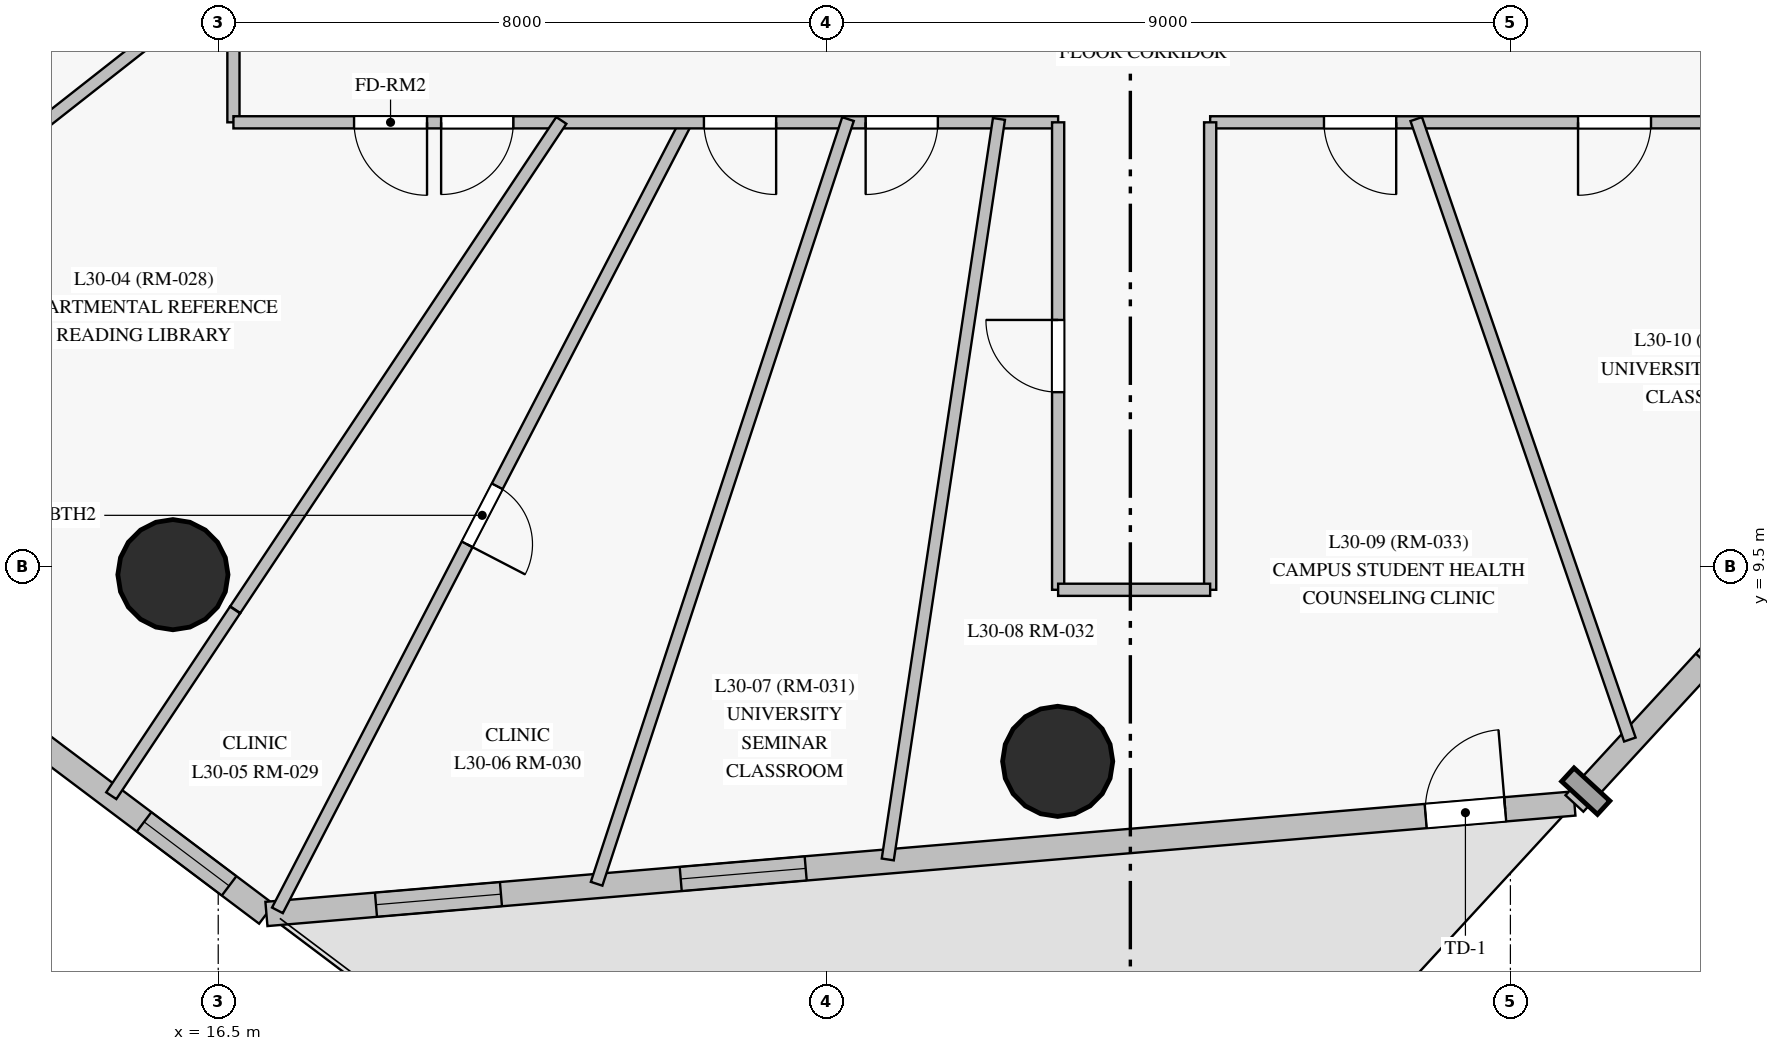
"""IFC4 building model, lengths in metres.
Left out: names, types, materials, properties, quantities, classifications, styles, units other than length and angle.
Written with IfcOpenShell. Run it as: python <this file> out.ifc"""

import sys

from ifc_helpers import new_model, si_unit, direction, frame, frame_2d, origin, origin_with_axes, origin_2d, place, context, subcontext, project, spatial, rectangle, circle, extrude, source, transform, mapped, element, fill, save


model = new_model("IFC4")
c1 = context("Model", 3, precision=1e-05, world=origin(), true_north=direction((0.0, 1.0)))
c2 = subcontext(c1, "Body", "Model", "MODEL_VIEW")
j1 = project(units=[si_unit("LENGTHUNIT", "METRE"), si_unit("PLANEANGLEUNIT", "RADIAN")], contexts=[c1])
p1 = place(None, origin())
s1 = spatial("IfcSite", under=j1, at=p1, CompositionType="ELEMENT")
p2 = place(p1, origin())
s2 = spatial("IfcBuilding", under=s1, at=p2, CompositionType="ELEMENT")
p3 = place(p2, frame((0.0, 0.0, 111.45)))
s3 = spatial("IfcBuildingStorey", under=s2, at=p3, CompositionType="ELEMENT", Elevation=111.45)
m1 = source(origin_with_axes(), c2, "Body", "SweptSolid", [
    extrude(circle(Radius=0.725, at=origin_2d()), origin(), (0.0, 0.0, 1.0), 3.05),
])
for number, where, z_axis, x_axis in (
    (1, (15.904, 9.399, 0.0), (0.0, 0.0, 1.0), (1.0, 0.0, 0.0)),
    (2, (27.544, 6.943, 0.0), (0.0, 0.0, 1.0), (1.0, 0.0, 0.0)),
):
    element("IfcColumn", number, at=place(p3, frame(where, z_axis=z_axis, x_axis=x_axis)), inside=s3, PredefinedType="COLUMN", context=c2, shape_type="MappedRepresentation", body=[
        mapped(m1, transform((0.0, 0.0, 0.0), scale=1.0)),
    ])
p4 = place(p3, frame((11.539, 9.148, 0.0), z_axis=(0.0, 0.0, 1.0), x_axis=(0.798890081763, -0.601477046329, 0.0)))
e3 = element("IfcWall", 3, at=p4, inside=s3, PredefinedType="SOLIDWALL", context=c2, shape_type="SweptSolid", body=[
    extrude(rectangle(XDim=7.003, YDim=0.32, at=frame_2d((3.502, 0.0))), origin(), (0.0, 0.0, 1.0), 2.825),
])
p5 = place(p4, frame((1.422, 0.0, 0.85)))
e4 = element("IfcOpeningElement", 4, at=p5, cuts=e3, PredefinedType="OPENING", context=c2, shape_type="SweptSolid", body=[
    extrude(rectangle(XDim=1.65, YDim=1.65, at=frame_2d((0.825, 0.825))), frame((0.0, 0.17, 0.0), z_axis=(0.0, -1.0, 0.0), x_axis=(1.0, 0.0, 0.0)), (0.0, 0.0, 1.0), 0.34),
])
p6 = place(p4, frame((4.989, 0.0, 0.85)))
e5 = element("IfcOpeningElement", 5, at=p6, cuts=e3, PredefinedType="OPENING", context=c2, shape_type="SweptSolid", body=[
    extrude(rectangle(XDim=1.4, YDim=1.65, at=frame_2d((0.7, 0.825))), frame((0.0, 0.17, 0.0), z_axis=(0.0, -1.0, 0.0), x_axis=(1.0, 0.0, 0.0)), (0.0, 0.0, 1.0), 0.34),
])
p7 = place(p3, frame((17.134, 4.935, 0.0), z_axis=(0.0, 0.0, 1.0), x_axis=(0.996451131553, 0.084173288083, 0.0)))
e6 = element("IfcWall", 6, at=p7, inside=s3, PredefinedType="SOLIDWALL", context=c2, shape_type="SweptSolid", body=[
    extrude(rectangle(XDim=17.269, YDim=0.32, at=frame_2d((8.635, 0.0))), origin(), (0.0, 0.0, 1.0), 2.825),
])
p8 = place(p7, frame((1.446, 0.0, 0.85)))
e7 = element("IfcOpeningElement", 7, at=p8, cuts=e6, PredefinedType="OPENING", context=c2, shape_type="SweptSolid", body=[
    extrude(rectangle(XDim=1.65, YDim=1.65, at=frame_2d((0.825, 0.825))), frame((0.0, 0.17, 0.0), z_axis=(0.0, -1.0, 0.0), x_axis=(1.0, 0.0, 0.0)), (0.0, 0.0, 1.0), 0.34),
])
p9 = place(p7, frame((5.47, 0.0, 0.85)))
e8 = element("IfcOpeningElement", 8, at=p9, cuts=e6, PredefinedType="OPENING", context=c2, shape_type="SweptSolid", body=[
    extrude(rectangle(XDim=1.65, YDim=1.65, at=frame_2d((0.825, 0.825))), frame((0.0, 0.17, 0.0), z_axis=(0.0, -1.0, 0.0), x_axis=(1.0, 0.0, 0.0)), (0.0, 0.0, 1.0), 0.34),
])
p10 = place(p7, frame((15.305, 0.0, 0.0)))
e9 = element("IfcOpeningElement", 9, at=p10, cuts=e6, PredefinedType="OPENING", context=c2, shape_type="SweptSolid", body=[
    extrude(rectangle(XDim=1.05, YDim=2.12, at=frame_2d((0.525, 1.06))), frame((0.0, 0.17, 0.0), z_axis=(0.0, -1.0, 0.0), x_axis=(1.0, 0.0, 0.0)), (0.0, 0.0, 1.0), 0.34),
])
p11 = place(p3, frame((34.342, 6.389, 0.0), z_axis=(0.0, 0.0, 1.0), x_axis=(0.677119694004, 0.735872896628, 0.0)))
e10 = element("IfcWall", 10, at=p11, inside=s3, PredefinedType="SOLIDWALL", context=c2, shape_type="SweptSolid", body=[
    extrude(rectangle(XDim=9.462, YDim=0.32, at=frame_2d((4.731, 0.0))), origin(), (0.0, 0.0, 1.0), 2.825),
])
p12 = place(p11, frame((2.533, 0.0, 0.85)))
e11 = element("IfcOpeningElement", 11, at=p12, cuts=e10, PredefinedType="OPENING", context=c2, shape_type="SweptSolid", body=[
    extrude(rectangle(XDim=1.65, YDim=1.65, at=frame_2d((0.825, 0.825))), frame((0.0, 0.17, 0.0), z_axis=(0.0, -1.0, 0.0), x_axis=(1.0, 0.0, 0.0)), (0.0, 0.0, 1.0), 0.34),
])
p13 = place(p11, frame((6.349, 0.0, 0.85)))
e12 = element("IfcOpeningElement", 12, at=p13, cuts=e10, PredefinedType="OPENING", context=c2, shape_type="SweptSolid", body=[
    extrude(rectangle(XDim=1.65, YDim=1.65, at=frame_2d((0.825, 0.825))), frame((0.0, 0.17, 0.0), z_axis=(0.0, -1.0, 0.0), x_axis=(1.0, 0.0, 0.0)), (0.0, 0.0, 1.0), 0.34),
])
p14 = place(p3, frame((16.7, 15.35, 0.0), z_axis=(0.0, 0.0, 1.0), x_axis=(0.0, 1.0, 0.0)))
e13 = element("IfcWall", 13, at=p14, inside=s3, PredefinedType="PARTITIONING", context=c2, shape_type="SweptSolid", body=[
    extrude(rectangle(XDim=22.3, YDim=0.16, at=frame_2d((11.15, 0.0))), origin(), (0.0, 0.0, 1.0), 2.225),
])
p15 = place(p14, frame((10.635, 0.0, 0.0)))
e14 = element("IfcOpeningElement", 14, at=p15, cuts=e13, PredefinedType="OPENING", context=c2, shape_type="SweptSolid", body=[
    extrude(rectangle(XDim=0.95, YDim=2.15, at=frame_2d((0.475, 1.075))), frame((0.0, 0.09, 0.0), z_axis=(0.0, -1.0, 0.0), x_axis=(1.0, 0.0, 0.0)), (0.0, 0.0, 1.0), 0.18),
])
p16 = place(p14, frame((5.64, 0.0, 0.0)))
e15 = element("IfcOpeningElement", 15, at=p16, cuts=e13, PredefinedType="OPENING", context=c2, shape_type="SweptSolid", body=[
    extrude(rectangle(XDim=0.96, YDim=2.15, at=frame_2d((0.48, 1.075))), frame((0.0, 0.09, 0.0), z_axis=(0.0, -1.0, 0.0), x_axis=(1.0, 0.0, 0.0)), (0.0, 0.0, 1.0), 0.18),
])
p17 = place(p14, frame((3.071, 0.0, 0.0)))
e16 = element("IfcOpeningElement", 16, at=p17, cuts=e13, PredefinedType="OPENING", context=c2, shape_type="SweptSolid", body=[
    extrude(rectangle(XDim=0.95, YDim=2.15, at=frame_2d((0.475, 1.075))), frame((0.0, 0.09, 0.0), z_axis=(0.0, -1.0, 0.0), x_axis=(1.0, 0.0, 0.0)), (0.0, 0.0, 1.0), 0.18),
])
p18 = place(p14, frame((16.25, 0.0, 0.0)))
e17 = element("IfcOpeningElement", 17, at=p18, cuts=e13, PredefinedType="OPENING", context=c2, shape_type="SweptSolid", body=[
    extrude(rectangle(XDim=0.95, YDim=2.15, at=frame_2d((0.475, 1.075))), frame((0.0, 0.09, 0.0), z_axis=(0.0, -1.0, 0.0), x_axis=(1.0, 0.0, 0.0)), (0.0, 0.0, 1.0), 0.18),
])
p19 = place(p14, frame((14.02, 0.0, 0.0)))
e18 = element("IfcOpeningElement", 18, at=p19, cuts=e13, PredefinedType="OPENING", context=c2, shape_type="SweptSolid", body=[
    extrude(rectangle(XDim=0.96, YDim=2.15, at=frame_2d((0.48, 1.075))), frame((0.0, 0.09, 0.0), z_axis=(0.0, -1.0, 0.0), x_axis=(1.0, 0.0, 0.0)), (0.0, 0.0, 1.0), 0.18),
])
p20 = place(p3, frame((22.667, 15.377, 0.0), z_axis=(0.0, 0.0, 1.0), x_axis=(-0.460195420674, -0.887817647262, 0.0)))
e19 = element("IfcWall", 19, at=p20, inside=s3, PredefinedType="PARTITIONING", context=c2, shape_type="SweptSolid", body=[
    extrude(rectangle(XDim=11.708, YDim=0.16, at=frame_2d((5.854, 0.0))), origin(), (0.0, 0.0, 1.0), 2.825),
])
p21 = place(p20, frame((5.424, 0.0, 0.0)))
e20 = element("IfcOpeningElement", 20, at=p21, cuts=e19, PredefinedType="OPENING", context=c2, shape_type="SweptSolid", body=[
    extrude(rectangle(XDim=0.86, YDim=2.04, at=frame_2d((0.43, 1.02))), frame((0.0, 0.09, 0.0), z_axis=(0.0, -1.0, 0.0), x_axis=(1.0, 0.0, 0.0)), (0.0, 0.0, 1.0), 0.18),
])
p22 = place(p3, frame((27.55, 15.35, 0.0), z_axis=(0.0, 0.0, 1.0), x_axis=(-1.0, 0.0, 0.0)))
e21 = element("IfcWall", 21, at=p22, inside=s3, PredefinedType="PARTITIONING", context=c2, shape_type="SweptSolid", body=[
    extrude(rectangle(XDim=10.85, YDim=0.16, at=frame_2d((5.425, 0.0))), origin(), (0.0, 0.0, 1.0), 2.325),
])
p23 = place(p22, frame((7.167, 0.0, 0.0)))
e22 = element("IfcOpeningElement", 22, at=p23, cuts=e21, PredefinedType="OPENING", context=c2, shape_type="SweptSolid", body=[
    extrude(rectangle(XDim=0.95, YDim=2.15, at=frame_2d((0.475, 1.075))), frame((0.0, 0.09, 0.0), z_axis=(0.0, -1.0, 0.0), x_axis=(1.0, 0.0, 0.0)), (0.0, 0.0, 1.0), 0.18),
])
p24 = place(p22, frame((3.71, 0.0, 0.0)))
e23 = element("IfcOpeningElement", 23, at=p24, cuts=e21, PredefinedType="OPENING", context=c2, shape_type="SweptSolid", body=[
    extrude(rectangle(XDim=0.95, YDim=2.15, at=frame_2d((0.475, 1.075))), frame((0.0, 0.09, 0.0), z_axis=(0.0, -1.0, 0.0), x_axis=(1.0, 0.0, 0.0)), (0.0, 0.0, 1.0), 0.18),
])
p25 = place(p22, frame((1.583, 0.0, 0.0)))
e24 = element("IfcOpeningElement", 24, at=p25, cuts=e21, PredefinedType="OPENING", context=c2, shape_type="SweptSolid", body=[
    extrude(rectangle(XDim=0.95, YDim=2.15, at=frame_2d((0.475, 1.075))), frame((0.0, 0.09, 0.0), z_axis=(0.0, -1.0, 0.0), x_axis=(1.0, 0.0, 0.0)), (0.0, 0.0, 1.0), 0.18),
])
p26 = place(p22, frame((8.303, 0.0, 0.0)))
e25 = element("IfcOpeningElement", 25, at=p26, cuts=e21, PredefinedType="OPENING", context=c2, shape_type="SweptSolid", body=[
    extrude(rectangle(XDim=0.96, YDim=2.15, at=frame_2d((0.48, 1.075))), frame((0.0, 0.09, 0.0), z_axis=(0.0, -1.0, 0.0), x_axis=(1.0, 0.0, 0.0)), (0.0, 0.0, 1.0), 0.18),
])
p27 = place(p3, frame((40.2, 15.35, 0.0), z_axis=(0.0, 0.0, 1.0), x_axis=(-1.0, 0.0, 0.0)))
e26 = element("IfcWall", 26, at=p27, inside=s3, PredefinedType="PARTITIONING", context=c2, shape_type="SweptSolid", body=[
    extrude(rectangle(XDim=10.65, YDim=0.16, at=frame_2d((5.325, 0.0))), origin(), (0.0, 0.0, 1.0), 2.225),
])
p28 = place(p27, frame((8.202, 0.0, 0.0)))
e27 = element("IfcOpeningElement", 27, at=p28, cuts=e26, PredefinedType="OPENING", context=c2, shape_type="SweptSolid", body=[
    extrude(rectangle(XDim=0.95, YDim=2.15, at=frame_2d((0.475, 1.075))), frame((0.0, 0.09, 0.0), z_axis=(0.0, -1.0, 0.0), x_axis=(1.0, 0.0, 0.0)), (0.0, 0.0, 1.0), 0.18),
])
p29 = place(p27, frame((4.85, 0.0, 0.0)))
e28 = element("IfcOpeningElement", 28, at=p29, cuts=e26, PredefinedType="OPENING", context=c2, shape_type="SweptSolid", body=[
    extrude(rectangle(XDim=0.96, YDim=2.15, at=frame_2d((0.48, 1.075))), frame((0.0, 0.09, 0.0), z_axis=(0.0, -1.0, 0.0), x_axis=(1.0, 0.0, 0.0)), (0.0, 0.0, 1.0), 0.18),
])
p30 = place(p3, frame((24.785, 15.393, 0.0), z_axis=(0.0, 0.0, 1.0), x_axis=(-0.312296564034, -0.949984660977, 0.0)))
e29 = element("IfcWall", 29, at=p30, inside=s3, PredefinedType="PARTITIONING", context=c2, shape_type="SweptSolid", body=[
    extrude(rectangle(XDim=10.59, YDim=0.16, at=frame_2d((5.295, 0.0))), origin(), (0.0, 0.0, 1.0), 2.825),
])
p31 = place(p3, frame((26.771, 15.395, 0.0), z_axis=(0.0, 0.0, 1.0), x_axis=(-0.148499207079, -0.988912526717, 0.0)))
e30 = element("IfcWall", 30, at=p31, inside=s3, PredefinedType="PARTITIONING", context=c2, shape_type="SweptSolid", body=[
    extrude(rectangle(XDim=9.851, YDim=0.16, at=frame_2d((4.926, 0.0))), origin(), (0.0, 0.0, 1.0), 2.225),
])
p32 = place(p3, frame((32.261, 15.393, 0.0), z_axis=(0.0, 0.0, 1.0), x_axis=(0.325587130811, -0.945512041304, 0.0)))
e31 = element("IfcWall", 31, at=p32, inside=s3, PredefinedType="PARTITIONING", context=c2, shape_type="SweptSolid", body=[
    extrude(rectangle(XDim=8.633, YDim=0.16, at=frame_2d((4.316, 0.0))), origin(), (0.0, 0.0, 1.0), 2.825),
])
p33 = place(p3, frame((21.014, 15.375, 0.0), z_axis=(0.0, 0.0, 1.0), x_axis=(-0.554554514282, -0.832147397214, 0.0)))
e32 = element("IfcWall", 32, at=p33, inside=s3, PredefinedType="PARTITIONING", context=c2, shape_type="SweptSolid", body=[
    extrude(rectangle(XDim=7.735, YDim=0.16, at=frame_2d((3.868, 0.0))), origin(), (0.0, 0.0, 1.0), 2.825),
])
p34 = place(p3, frame((29.55, 15.35, 0.0), z_axis=(0.0, 0.0, 1.0), x_axis=(0.0, -1.0, 0.0)))
e33 = element("IfcWall", 33, at=p34, inside=s3, PredefinedType="PARTITIONING", context=c2, shape_type="SweptSolid", body=[
    extrude(rectangle(XDim=6.15, YDim=0.16, at=frame_2d((3.075, 0.0))), origin(), (0.0, 0.0, 1.0), 2.825),
])
p35 = place(p3, frame((27.55, 9.2, 0.0), z_axis=(0.0, 0.0, 1.0), x_axis=(0.0, 1.0, 0.0)))
e34 = element("IfcWall", 34, at=p35, inside=s3, PredefinedType="PARTITIONING", context=c2, shape_type="SweptSolid", body=[
    extrude(rectangle(XDim=6.15, YDim=0.16, at=frame_2d((3.075, 0.0))), origin(), (0.0, 0.0, 1.0), 2.225),
])
p36 = place(p35, frame((2.6, 0.0, 0.0)))
e35 = element("IfcOpeningElement", 35, at=p36, cuts=e34, PredefinedType="OPENING", context=c2, shape_type="SweptSolid", body=[
    extrude(rectangle(XDim=0.95, YDim=2.15, at=frame_2d((0.475, 1.075))), frame((0.0, 0.09, 0.0), z_axis=(0.0, -1.0, 0.0), x_axis=(1.0, 0.0, 0.0)), (0.0, 0.0, 1.0), 0.18),
])
p37 = place(p3, frame((16.735, 17.331, 0.0), z_axis=(0.0, 0.0, 1.0), x_axis=(-0.786302323137, -0.617841934987, 0.0)))
e36 = element("IfcWall", 36, at=p37, inside=s3, PredefinedType="PARTITIONING", context=c2, shape_type="SweptSolid", body=[
    extrude(rectangle(XDim=4.761, YDim=0.16, at=frame_2d((2.38, 0.0))), origin(), (0.0, 0.0, 1.0), 2.225),
])
p38 = place(p3, frame((16.721, 8.934, 0.0), z_axis=(0.0, 0.0, 1.0), x_axis=(-0.554565860438, -0.832139835867, 0.0)))
e37 = element("IfcWall", 37, at=p38, inside=s3, PredefinedType="PARTITIONING", context=c2, shape_type="SweptSolid", body=[
    extrude(rectangle(XDim=2.936, YDim=0.16, at=frame_2d((1.468, 0.0))), origin(), (0.0, 0.0, 1.0), 2.825),
])
p39 = place(p3, frame((29.55, 9.2, 0.0), z_axis=(0.0, 0.0, 1.0), x_axis=(-1.0, 0.0, 0.0)))
e38 = element("IfcWall", 38, at=p39, inside=s3, PredefinedType="PARTITIONING", context=c2, shape_type="SweptSolid", body=[
    extrude(rectangle(XDim=2.0, YDim=0.16, at=frame_2d((1.0, 0.0))), origin(), (0.0, 0.0, 1.0), 2.325),
])
m2 = source(origin_with_axes(), c2, "Body", "SweptSolid", [
    extrude(rectangle(XDim=1.4, YDim=1.65, at=frame_2d((0.7, 0.825))), frame((0.0, 0.03, 0.0), z_axis=(0.0, -1.0, 0.0), x_axis=(1.0, 0.0, 0.0)), (0.0, 0.0, 1.0), 0.06),
])
p40 = place(p6, origin())
e39 = element("IfcWindow", 39, at=p40, inside=s3, PartitioningType="SINGLE_PANEL", PredefinedType="WINDOW", context=c2, shape_type="MappedRepresentation", body=[
    mapped(m2, transform((0.0, 0.0, 0.0), scale=1.0)),
])
fill(e5, e39)
m3 = source(origin_with_axes(), c2, "Body", "SweptSolid", [
    extrude(rectangle(XDim=1.65, YDim=1.65, at=frame_2d((0.825, 0.825))), frame((0.0, 0.03, 0.0), z_axis=(0.0, -1.0, 0.0), x_axis=(1.0, 0.0, 0.0)), (0.0, 0.0, 1.0), 0.06),
])
p41 = place(p8, origin())
e40 = element("IfcWindow", 40, at=p41, inside=s3, PartitioningType="SINGLE_PANEL", PredefinedType="WINDOW", context=c2, shape_type="MappedRepresentation", body=[
    mapped(m3, transform((0.0, 0.0, 0.0), scale=1.0)),
])
fill(e7, e40)
p42 = place(p9, origin())
e41 = element("IfcWindow", 41, at=p42, inside=s3, PartitioningType="SINGLE_PANEL", PredefinedType="WINDOW", context=c2, shape_type="MappedRepresentation", body=[
    mapped(m3, transform((0.0, 0.0, 0.0), scale=1.0)),
])
fill(e8, e41)
m4 = source(origin_with_axes(), c2, "Body", "SweptSolid", [
    extrude(rectangle(XDim=1.05, YDim=2.12, at=frame_2d((0.525, 1.06))), frame((0.0, 0.025, 0.0), z_axis=(0.0, -1.0, 0.0), x_axis=(1.0, 0.0, 0.0)), (0.0, 0.0, 1.0), 0.05),
])
p43 = place(p10, origin())
e42 = element("IfcDoor", 42, at=p43, inside=s3, OperationType="SINGLE_SWING_RIGHT", PredefinedType="DOOR", context=c2, shape_type="MappedRepresentation", body=[
    mapped(m4, transform((0.0, 0.0, 0.0), scale=1.0)),
])
fill(e9, e42)
m5 = source(origin_with_axes(), c2, "Body", "SweptSolid", [
    extrude(rectangle(XDim=0.95, YDim=2.15, at=frame_2d((0.475, 1.075))), frame((0.0, 0.025, 0.0), z_axis=(0.0, -1.0, 0.0), x_axis=(1.0, 0.0, 0.0)), (0.0, 0.0, 1.0), 0.05),
])
p44 = place(p23, origin())
e43 = element("IfcDoor", 43, at=p44, inside=s3, OperationType="SINGLE_SWING_RIGHT", PredefinedType="DOOR", context=c2, shape_type="MappedRepresentation", body=[
    mapped(m5, transform((0.0, 0.0, 0.0), scale=1.0)),
])
fill(e22, e43)
p45 = place(p24, origin())
e44 = element("IfcDoor", 44, at=p45, inside=s3, OperationType="SINGLE_SWING_LEFT", PredefinedType="DOOR", context=c2, shape_type="MappedRepresentation", body=[
    mapped(m5, transform((0.0, 0.0, 0.0), scale=1.0)),
])
fill(e23, e44)
p46 = place(p25, origin())
e45 = element("IfcDoor", 45, at=p46, inside=s3, OperationType="SINGLE_SWING_RIGHT", PredefinedType="DOOR", context=c2, shape_type="MappedRepresentation", body=[
    mapped(m5, transform((0.0, 0.0, 0.0), scale=1.0)),
])
fill(e24, e45)
m6 = source(origin_with_axes(), c2, "Body", "SweptSolid", [
    extrude(rectangle(XDim=0.96, YDim=2.15, at=frame_2d((0.48, 1.075))), frame((0.0, 0.025, 0.0), z_axis=(0.0, -1.0, 0.0), x_axis=(1.0, 0.0, 0.0)), (0.0, 0.0, 1.0), 0.05),
])
p47 = place(p26, origin())
e46 = element("IfcDoor", 46, at=p47, inside=s3, OperationType="SINGLE_SWING_LEFT", PredefinedType="DOOR", context=c2, shape_type="MappedRepresentation", body=[
    mapped(m6, transform((0.0, 0.0, 0.0), scale=1.0)),
])
fill(e25, e46)
p48 = place(p36, origin())
e47 = element("IfcDoor", 47, at=p48, inside=s3, OperationType="SINGLE_SWING_RIGHT", PredefinedType="DOOR", context=c2, shape_type="MappedRepresentation", body=[
    mapped(m5, transform((0.0, 0.0, 0.0), scale=1.0)),
])
fill(e35, e47)
p49 = place(p28, origin())
e48 = element("IfcDoor", 48, at=p49, inside=s3, OperationType="SINGLE_SWING_LEFT", PredefinedType="DOOR", context=c2, shape_type="MappedRepresentation", body=[
    mapped(m5, transform((0.0, 0.0, 0.0), scale=1.0)),
])
fill(e27, e48)
p50 = place(p29, origin())
e49 = element("IfcDoor", 49, at=p50, inside=s3, OperationType="SINGLE_SWING_RIGHT", PredefinedType="DOOR", context=c2, shape_type="MappedRepresentation", body=[
    mapped(m6, transform((0.0, 0.0, 0.0), scale=1.0)),
])
fill(e28, e49)
m7 = source(origin_with_axes(), c2, "Body", "SweptSolid", [
    extrude(rectangle(XDim=0.86, YDim=2.04, at=frame_2d((0.43, 1.02))), frame((0.0, 0.025, 0.0), z_axis=(0.0, -1.0, 0.0), x_axis=(1.0, 0.0, 0.0)), (0.0, 0.0, 1.0), 0.05),
])
p51 = place(p21, origin())
e50 = element("IfcDoor", 50, at=p51, inside=s3, OperationType="SINGLE_SWING_RIGHT", PredefinedType="DOOR", context=c2, shape_type="MappedRepresentation", body=[
    mapped(m7, transform((0.0, 0.0, 0.0), scale=1.0)),
])
fill(e20, e50)
save(model, sys.argv[1])
